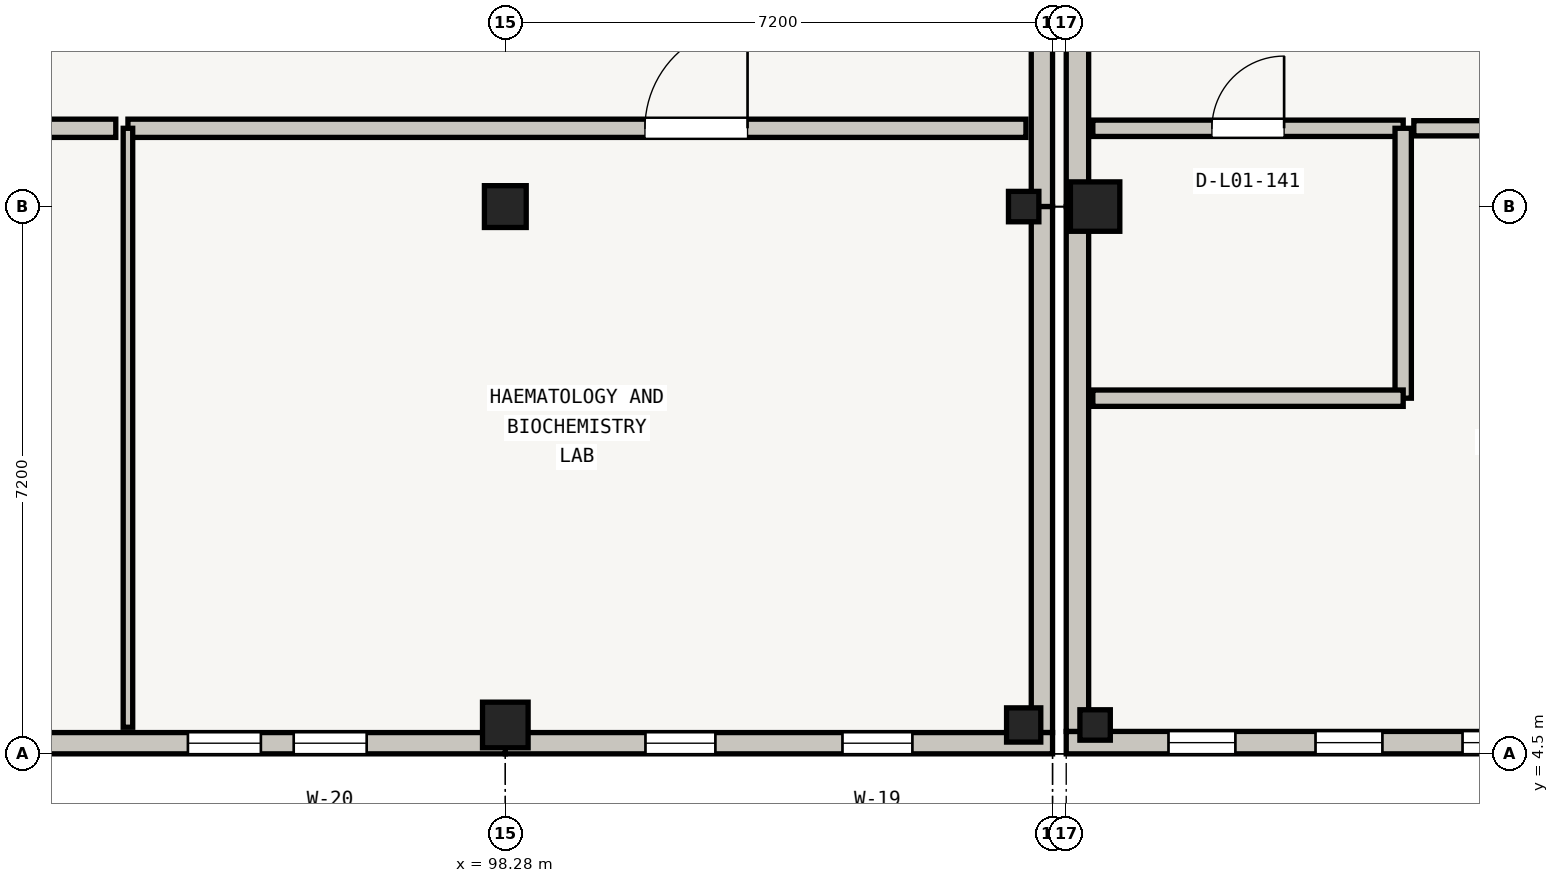
"""IFC4 building model, lengths in metres.
Left out: names, types, materials, properties, quantities, classifications, styles, units other than length and angle.
Written with IfcOpenShell. Run it as: python <this file> out.ifc"""

import sys

from ifc_helpers import new_model, si_unit, direction, frame, frame_2d, origin, origin_2d, place, context, subcontext, project, spatial, rectangle, extrude, element, fill, save


model = new_model("IFC4")
c1 = context("Model", 3, precision=1e-05, world=origin(), true_north=direction((0.0, 1.0)))
c2 = subcontext(c1, "Body", "Model", "MODEL_VIEW")
j1 = project(units=[si_unit("LENGTHUNIT", "METRE"), si_unit("PLANEANGLEUNIT", "RADIAN")], contexts=[c1])
p1 = place(None, origin())
s1 = spatial("IfcSite", under=j1, at=p1, CompositionType="ELEMENT")
p2 = place(p1, origin())
s2 = spatial("IfcBuilding", under=s1, at=p2, CompositionType="ELEMENT")
p3 = place(p2, frame((0.0, 0.0, 4.5)))
s3 = spatial("IfcBuildingStorey", under=s2, at=p3, CompositionType="ELEMENT", Elevation=4.5)
p4 = place(p3, frame((98.28, 4.88, 0.0), z_axis=(0.0, 0.0, 1.0), x_axis=(1.0, 0.0, 0.0)))
e1 = element("IfcColumn", 1, at=p4, inside=s3, PredefinedType="COLUMN", context=c2, shape_type="SweptSolid", body=[
    extrude(rectangle(XDim=0.6, YDim=0.6, at=origin_2d()), origin(), (0.0, 0.0, 1.0), 3.96),
])
p5 = place(p3, frame((98.28, 11.7, 0.0), z_axis=(0.0, 0.0, 1.0), x_axis=(1.0, 0.0, 0.0)))
e2 = element("IfcColumn", 2, at=p5, inside=s3, PredefinedType="COLUMN", context=c2, shape_type="SweptSolid", body=[
    extrude(rectangle(XDim=0.55, YDim=0.55, at=origin_2d()), origin(), (0.0, 0.0, 1.0), 3.96),
])
p6 = place(p3, frame((105.1, 4.88, 0.0), z_axis=(0.0, 0.0, 1.0), x_axis=(1.0, 0.0, 0.0)))
e3 = element("IfcColumn", 3, at=p6, inside=s3, PredefinedType="COLUMN", context=c2, shape_type="SweptSolid", body=[
    extrude(rectangle(XDim=0.45, YDim=0.45, at=origin_2d()), origin(), (0.0, 0.0, 1.0), 3.96),
])
p7 = place(p3, frame((105.1, 11.7, 0.0), z_axis=(0.0, 0.0, 1.0), x_axis=(1.0, 0.0, 0.0)))
e4 = element("IfcColumn", 4, at=p7, inside=s3, PredefinedType="COLUMN", context=c2, shape_type="SweptSolid", body=[
    extrude(rectangle(XDim=0.4, YDim=0.4, at=origin_2d()), origin(), (0.0, 0.0, 1.0), 3.96),
])
p8 = place(p3, frame((106.04, 4.88, 0.0), z_axis=(0.0, 0.0, 1.0), x_axis=(1.0, 0.0, 0.0)))
e5 = element("IfcColumn", 5, at=p8, inside=s3, PredefinedType="COLUMN", context=c2, shape_type="SweptSolid", body=[
    extrude(rectangle(XDim=0.4, YDim=0.4, at=origin_2d()), origin(), (0.0, 0.0, 1.0), 3.905),
])
p9 = place(p3, frame((106.04, 11.7, 0.0), z_axis=(0.0, 0.0, 1.0), x_axis=(1.0, 0.0, 0.0)))
e6 = element("IfcColumn", 6, at=p9, inside=s3, PredefinedType="COLUMN", context=c2, shape_type="SweptSolid", body=[
    extrude(rectangle(XDim=0.65, YDim=0.65, at=origin_2d()), origin(), (0.0, 0.0, 1.0), 3.905),
])
p10 = place(p3, frame((105.34, 18.62, 0.0), z_axis=(0.0, 0.0, 1.0), x_axis=(0.0, -1.0, 0.0)))
e7 = element("IfcWall", 7, at=p10, inside=s3, PredefinedType="STANDARD", context=c2, shape_type="SweptSolid", body=[
    extrude(rectangle(XDim=6.92, YDim=0.28, at=frame_2d((3.46, 0.0))), origin(), (0.0, 0.0, 1.0), 3.995),
])
p11 = place(p3, frame((105.34, 11.7, 0.0), z_axis=(0.0, 0.0, 1.0), x_axis=(0.0, -1.0, 0.0)))
e8 = element("IfcWall", 8, at=p11, inside=s3, PredefinedType="STANDARD", context=c2, shape_type="SweptSolid", body=[
    extrude(rectangle(XDim=6.92, YDim=0.28, at=frame_2d((3.46, 0.0))), origin(), (0.0, 0.0, 1.0), 3.656),
])
p12 = place(p3, frame((105.48, 4.64, 0.0), z_axis=(0.0, 0.0, 1.0), x_axis=(-1.0, 0.0, 0.0)))
e9 = element("IfcWall", 9, at=p12, inside=s3, PredefinedType="STANDARD", context=c2, shape_type="SweptSolid", body=[
    extrude(rectangle(XDim=7.2, YDim=0.28, at=frame_2d((3.6, 0.0))), origin(), (0.0, 0.0, 1.0), 3.656),
])
p13 = place(p12, frame((1.844, 0.0, 0.55)))
e10 = element("IfcOpeningElement", 10, at=p13, cuts=e9, PredefinedType="OPENING", context=c2, shape_type="SweptSolid", body=[
    extrude(rectangle(XDim=0.92, YDim=2.1, at=frame_2d((0.46, 1.05))), frame((0.0, 0.14, 0.0), z_axis=(0.0, -1.0, 0.0), x_axis=(1.0, 0.0, 0.0)), (0.0, 0.0, 1.0), 0.28),
])
p14 = place(p12, frame((4.436, 0.0, 0.55)))
e11 = element("IfcOpeningElement", 11, at=p14, cuts=e9, PredefinedType="OPENING", context=c2, shape_type="SweptSolid", body=[
    extrude(rectangle(XDim=0.92, YDim=2.1, at=frame_2d((0.46, 1.05))), frame((0.0, 0.14, 0.0), z_axis=(0.0, -1.0, 0.0), x_axis=(1.0, 0.0, 0.0)), (0.0, 0.0, 1.0), 0.28),
])
p15 = place(p3, frame((98.28, 4.64, 0.0), z_axis=(0.0, 0.0, 1.0), x_axis=(-1.0, 0.0, 0.0)))
e12 = element("IfcWall", 12, at=p15, inside=s3, PredefinedType="STANDARD", context=c2, shape_type="SweptSolid", body=[
    extrude(rectangle(XDim=7.2, YDim=0.28, at=frame_2d((3.6, 0.0))), origin(), (0.0, 0.0, 1.0), 3.656),
])
p16 = place(p15, frame((1.824, 0.0, 0.55)))
e13 = element("IfcOpeningElement", 13, at=p16, cuts=e12, PredefinedType="OPENING", context=c2, shape_type="SweptSolid", body=[
    extrude(rectangle(XDim=0.96, YDim=2.1, at=frame_2d((0.48, 1.05))), frame((0.0, 0.14, 0.0), z_axis=(0.0, -1.0, 0.0), x_axis=(1.0, 0.0, 0.0)), (0.0, 0.0, 1.0), 0.28),
])
p17 = place(p15, frame((3.216, 0.0, 0.55)))
e14 = element("IfcOpeningElement", 14, at=p17, cuts=e12, PredefinedType="OPENING", context=c2, shape_type="SweptSolid", body=[
    extrude(rectangle(XDim=0.96, YDim=2.1, at=frame_2d((0.48, 1.05))), frame((0.0, 0.14, 0.0), z_axis=(0.0, -1.0, 0.0), x_axis=(1.0, 0.0, 0.0)), (0.0, 0.0, 1.0), 0.28),
])
p18 = place(p3, frame((113.1, 4.647, 0.0), z_axis=(0.0, 0.0, 1.0), x_axis=(-1.0, 0.0, 0.0)))
e15 = element("IfcWall", 15, at=p18, inside=s3, PredefinedType="STANDARD", context=c2, shape_type="SweptSolid", body=[
    extrude(rectangle(XDim=7.44, YDim=0.295, at=frame_2d((3.72, 0.0))), origin(), (0.0, 0.0, 1.0), 3.27),
])
p19 = place(p18, frame((1.346, 0.0, 0.55)))
e16 = element("IfcOpeningElement", 16, at=p19, cuts=e15, PredefinedType="OPENING", context=c2, shape_type="SweptSolid", body=[
    extrude(rectangle(XDim=0.88, YDim=1.8, at=frame_2d((0.44, 0.9))), frame((0.0, 0.147, 0.0), z_axis=(0.0, -1.0, 0.0), x_axis=(1.0, 0.0, 0.0)), (0.0, 0.0, 1.0), 0.295),
])
p20 = place(p18, frame((3.28, 0.0, 0.55)))
e17 = element("IfcOpeningElement", 17, at=p20, cuts=e15, PredefinedType="OPENING", context=c2, shape_type="SweptSolid", body=[
    extrude(rectangle(XDim=0.88, YDim=1.8, at=frame_2d((0.44, 0.9))), frame((0.0, 0.147, 0.0), z_axis=(0.0, -1.0, 0.0), x_axis=(1.0, 0.0, 0.0)), (0.0, 0.0, 1.0), 0.295),
])
p21 = place(p18, frame((5.214, 0.0, 0.55)))
e18 = element("IfcOpeningElement", 18, at=p21, cuts=e15, PredefinedType="OPENING", context=c2, shape_type="SweptSolid", body=[
    extrude(rectangle(XDim=0.88, YDim=1.8, at=frame_2d((0.44, 0.9))), frame((0.0, 0.147, 0.0), z_axis=(0.0, -1.0, 0.0), x_axis=(1.0, 0.0, 0.0)), (0.0, 0.0, 1.0), 0.295),
])
for number, where, z_axis, x_axis in (
    (19, (105.808, 4.795, 0.0), (0.0, 0.0, 1.0), (0.0, 1.0, 0.0)),
    (20, (105.808, 11.7, 0.0), (0.0, 0.0, 1.0), (0.0, 1.0, 0.0)),
):
    element("IfcWall", number, at=place(p3, frame(where, z_axis=z_axis, x_axis=x_axis)), inside=s3, PredefinedType="STANDARD", context=c2, shape_type="SweptSolid", body=[
        extrude(rectangle(XDim=6.905, YDim=0.295, at=frame_2d((3.453, 0.0))), origin(), (0.0, 0.0, 1.0), 3.29),
    ])
p22 = place(p3, frame((93.315, 12.73, 0.0), z_axis=(0.0, 0.0, 1.0), x_axis=(1.0, 0.0, 0.0)))
e21 = element("IfcWall", 21, at=p22, inside=s3, PredefinedType="SOLIDWALL", context=c2, shape_type="SweptSolid", body=[
    extrude(rectangle(XDim=11.815, YDim=0.24, at=frame_2d((5.907, 0.0))), origin(), (0.0, 0.0, 1.0), 2.905),
])
p23 = place(p22, frame((6.802, 0.0, 0.0)))
e22 = element("IfcOpeningElement", 22, at=p23, cuts=e21, PredefinedType="OPENING", context=c2, shape_type="SweptSolid", body=[
    extrude(rectangle(XDim=1.35, YDim=2.1, at=frame_2d((0.675, 1.05))), frame((0.0, 0.12, 0.0), z_axis=(0.0, -1.0, 0.0), x_axis=(1.0, 0.0, 0.0)), (0.0, 0.0, 1.0), 0.24),
])
p24 = place(p3, frame((93.315, 4.85, 0.0), z_axis=(0.0, 0.0, 1.0), x_axis=(0.0, 1.0, 0.0)))
e23 = element("IfcWall", 23, at=p24, inside=s3, PredefinedType="PARTITIONING", context=c2, shape_type="SweptSolid", body=[
    extrude(rectangle(XDim=7.88, YDim=0.125, at=frame_2d((3.94, 0.0))), origin(), (0.0, 0.0, 1.0), 2.905),
])
p25 = place(p3, frame((81.34, 12.73, 0.0), z_axis=(0.0, 0.0, 1.0), x_axis=(1.0, 0.0, 0.0)))
e24 = element("IfcWall", 24, at=p25, inside=s3, PredefinedType="SOLIDWALL", context=c2, shape_type="SweptSolid", body=[
    extrude(rectangle(XDim=11.815, YDim=0.24, at=frame_2d((5.907, 0.0))), origin(), (0.0, 0.0, 1.0), 2.905),
])
p26 = place(p25, frame((5.232, 0.0, 0.0)))
e25 = element("IfcOpeningElement", 25, at=p26, cuts=e24, PredefinedType="OPENING", context=c2, shape_type="SweptSolid", body=[
    extrude(rectangle(XDim=1.35, YDim=2.1, at=frame_2d((0.675, 1.05))), frame((0.0, 0.12, 0.0), z_axis=(0.0, -1.0, 0.0), x_axis=(1.0, 0.0, 0.0)), (0.0, 0.0, 1.0), 0.24),
])
p27 = place(p3, frame((106.01, 12.73, 0.0), z_axis=(0.0, 0.0, 1.0), x_axis=(1.0, 0.0, 0.0)))
e26 = element("IfcWall", 26, at=p27, inside=s3, PredefinedType="PLUMBINGWALL", context=c2, shape_type="SweptSolid", body=[
    extrude(rectangle(XDim=4.083, YDim=0.215, at=frame_2d((2.042, 0.0))), origin(), (0.0, 0.0, 1.0), 2.925),
])
p28 = place(p27, frame((1.567, 0.0, 0.0)))
e27 = element("IfcOpeningElement", 27, at=p28, cuts=e26, PredefinedType="OPENING", context=c2, shape_type="SweptSolid", body=[
    extrude(rectangle(XDim=0.95, YDim=2.05, at=frame_2d((0.475, 1.025))), frame((0.0, 0.107, 0.0), z_axis=(0.0, -1.0, 0.0), x_axis=(1.0, 0.0, 0.0)), (0.0, 0.0, 1.0), 0.215),
])
p29 = place(p3, frame((110.094, 12.73, 0.0), z_axis=(0.0, 0.0, 1.0), x_axis=(0.0, -1.0, 0.0)))
e28 = element("IfcWall", 28, at=p29, inside=s3, PredefinedType="PLUMBINGWALL", context=c2, shape_type="SweptSolid", body=[
    extrude(rectangle(XDim=3.551, YDim=0.215, at=frame_2d((1.775, 0.0))), origin(), (0.0, 0.0, 1.0), 2.925),
])
p30 = place(p3, frame((110.094, 9.179, 0.0), z_axis=(0.0, 0.0, 1.0), x_axis=(-1.0, 0.0, 0.0)))
e29 = element("IfcWall", 29, at=p30, inside=s3, PredefinedType="PLUMBINGWALL", context=c2, shape_type="SweptSolid", body=[
    extrude(rectangle(XDim=4.083, YDim=0.215, at=frame_2d((2.042, 0.0))), origin(), (0.0, 0.0, 1.0), 2.925),
])
p31 = place(p3, frame((110.233, 12.73, 0.0), z_axis=(0.0, 0.0, 1.0), x_axis=(1.0, 0.0, 0.0)))
e30 = element("IfcWall", 30, at=p31, inside=s3, PredefinedType="SOLIDWALL", context=c2, shape_type="SweptSolid", body=[
    extrude(rectangle(XDim=7.527, YDim=0.2, at=frame_2d((3.763, 0.0))), origin(), (0.0, 0.0, 1.0), 2.925),
])
p32 = place(p31, frame((4.112, 0.0, 0.0)))
e31 = element("IfcOpeningElement", 31, at=p32, cuts=e30, PredefinedType="OPENING", context=c2, shape_type="SweptSolid", body=[
    extrude(rectangle(XDim=1.2, YDim=2.05, at=frame_2d((0.6, 1.025))), frame((0.0, 0.1, 0.0), z_axis=(0.0, -1.0, 0.0), x_axis=(1.0, 0.0, 0.0)), (0.0, 0.0, 1.0), 0.2),
])
p33 = place(p13, origin())
e32 = element("IfcWindow", 32, at=p33, inside=s3, PartitioningType="DOUBLE_PANEL_VERTICAL", PredefinedType="WINDOW", context=c2, shape_type="SweptSolid", body=[
    extrude(rectangle(XDim=0.92, YDim=2.1, at=frame_2d((0.46, 1.05))), frame((0.0, 0.03, 0.0), z_axis=(0.0, -1.0, 0.0), x_axis=(1.0, 0.0, 0.0)), (0.0, 0.0, 1.0), 0.06),
])
fill(e10, e32)
p34 = place(p14, origin())
e33 = element("IfcWindow", 33, at=p34, inside=s3, PartitioningType="DOUBLE_PANEL_VERTICAL", PredefinedType="WINDOW", context=c2, shape_type="SweptSolid", body=[
    extrude(rectangle(XDim=0.92, YDim=2.1, at=frame_2d((0.46, 1.05))), frame((0.0, 0.03, 0.0), z_axis=(0.0, -1.0, 0.0), x_axis=(1.0, 0.0, 0.0)), (0.0, 0.0, 1.0), 0.06),
])
fill(e11, e33)
p35 = place(p16, origin())
e34 = element("IfcWindow", 34, at=p35, inside=s3, PartitioningType="DOUBLE_PANEL_VERTICAL", PredefinedType="WINDOW", context=c2, shape_type="SweptSolid", body=[
    extrude(rectangle(XDim=0.96, YDim=2.1, at=frame_2d((0.48, 1.05))), frame((0.0, 0.03, 0.0), z_axis=(0.0, -1.0, 0.0), x_axis=(1.0, 0.0, 0.0)), (0.0, 0.0, 1.0), 0.06),
])
fill(e13, e34)
p36 = place(p17, origin())
e35 = element("IfcWindow", 35, at=p36, inside=s3, PartitioningType="DOUBLE_PANEL_VERTICAL", PredefinedType="WINDOW", context=c2, shape_type="SweptSolid", body=[
    extrude(rectangle(XDim=0.96, YDim=2.1, at=frame_2d((0.48, 1.05))), frame((0.0, 0.03, 0.0), z_axis=(0.0, -1.0, 0.0), x_axis=(1.0, 0.0, 0.0)), (0.0, 0.0, 1.0), 0.06),
])
fill(e14, e35)
p37 = place(p19, origin())
e36 = element("IfcWindow", 36, at=p37, inside=s3, PartitioningType="SINGLE_PANEL", PredefinedType="WINDOW", context=c2, shape_type="SweptSolid", body=[
    extrude(rectangle(XDim=0.88, YDim=1.8, at=frame_2d((0.44, 0.9))), frame((0.0, 0.03, 0.0), z_axis=(0.0, -1.0, 0.0), x_axis=(1.0, 0.0, 0.0)), (0.0, 0.0, 1.0), 0.06),
])
fill(e16, e36)
p38 = place(p20, origin())
e37 = element("IfcWindow", 37, at=p38, inside=s3, PartitioningType="SINGLE_PANEL", PredefinedType="WINDOW", context=c2, shape_type="SweptSolid", body=[
    extrude(rectangle(XDim=0.88, YDim=1.8, at=frame_2d((0.44, 0.9))), frame((0.0, 0.03, 0.0), z_axis=(0.0, -1.0, 0.0), x_axis=(1.0, 0.0, 0.0)), (0.0, 0.0, 1.0), 0.06),
])
fill(e17, e37)
p39 = place(p21, origin())
e38 = element("IfcWindow", 38, at=p39, inside=s3, PartitioningType="SINGLE_PANEL", PredefinedType="WINDOW", context=c2, shape_type="SweptSolid", body=[
    extrude(rectangle(XDim=0.88, YDim=1.8, at=frame_2d((0.44, 0.9))), frame((0.0, 0.03, 0.0), z_axis=(0.0, -1.0, 0.0), x_axis=(1.0, 0.0, 0.0)), (0.0, 0.0, 1.0), 0.06),
])
fill(e18, e38)
p40 = place(p23, origin())
e39 = element("IfcDoor", 39, at=p40, inside=s3, OperationType="SINGLE_SWING_RIGHT", PredefinedType="DOOR", context=c2, shape_type="SweptSolid", body=[
    extrude(rectangle(XDim=1.35, YDim=2.1, at=frame_2d((0.675, 1.05))), frame((0.0, 0.025, 0.0), z_axis=(0.0, -1.0, 0.0), x_axis=(1.0, 0.0, 0.0)), (0.0, 0.0, 1.0), 0.05),
])
fill(e22, e39)
p41 = place(p28, origin())
e40 = element("IfcDoor", 40, at=p41, inside=s3, OperationType="SINGLE_SWING_RIGHT", PredefinedType="DOOR", context=c2, shape_type="SweptSolid", body=[
    extrude(rectangle(XDim=0.95, YDim=2.05, at=frame_2d((0.475, 1.025))), frame((0.0, 0.025, 0.0), z_axis=(0.0, -1.0, 0.0), x_axis=(1.0, 0.0, 0.0)), (0.0, 0.0, 1.0), 0.05),
])
fill(e27, e40)
save(model, sys.argv[1])
